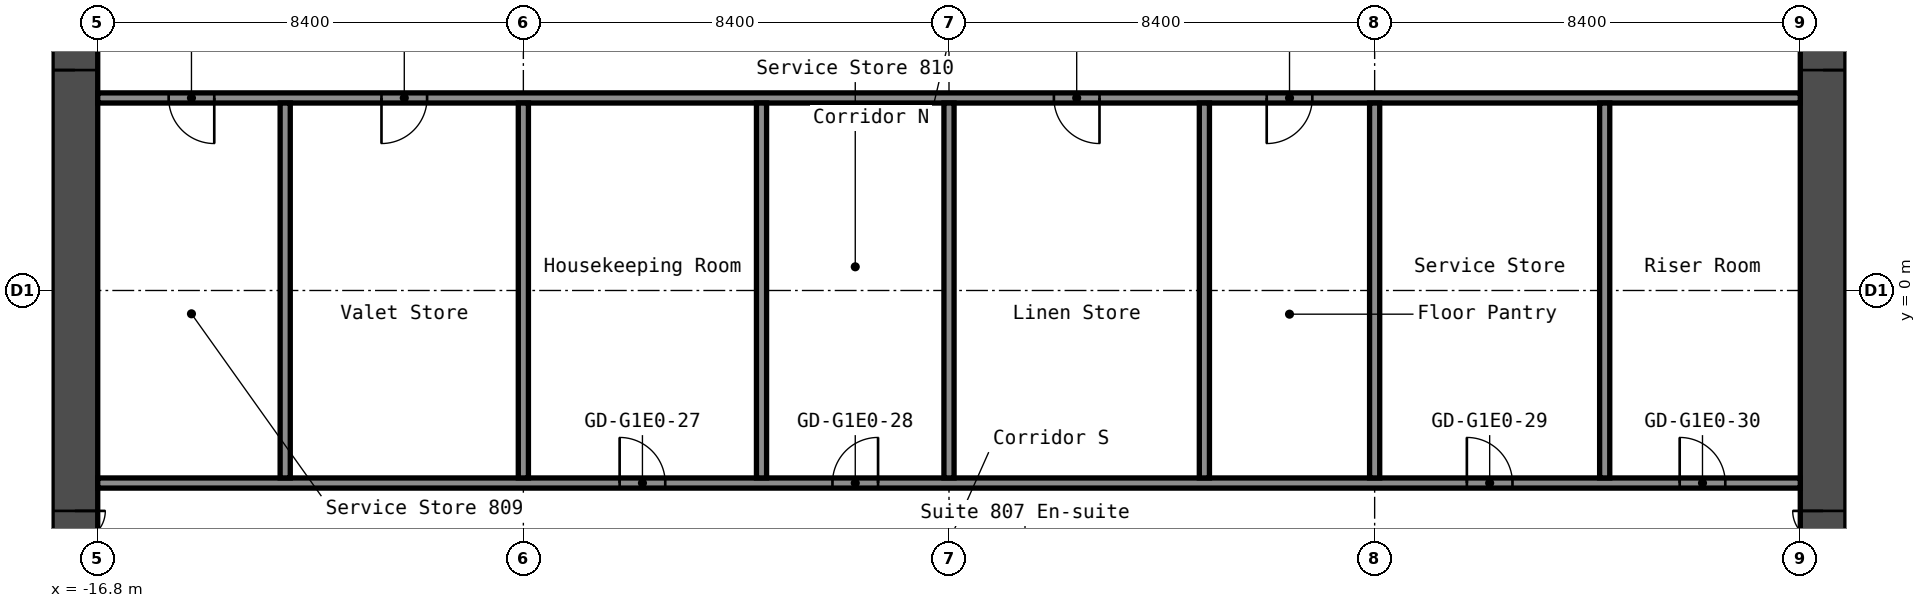
"""IFC4 building model, lengths in metres.
Left out: names, types, materials, properties, quantities, classifications, styles, units other than length and angle.
Written with IfcOpenShell. Run it as: python <this file> out.ifc"""

import sys

from ifc_helpers import new_model, si_unit, direction, frame, frame_2d, origin, place, context, subcontext, project, spatial, rectangle, extrude, element, fill, save


model = new_model("IFC4")
c1 = context("Model", 3, precision=1e-05, world=origin(), true_north=direction((0.0, 1.0)))
c2 = subcontext(c1, "Body", "Model", "MODEL_VIEW")
j1 = project(units=[si_unit("LENGTHUNIT", "METRE"), si_unit("PLANEANGLEUNIT", "RADIAN")], contexts=[c1])
p1 = place(None, origin())
s1 = spatial("IfcSite", under=j1, at=p1, CompositionType="ELEMENT")
p2 = place(p1, origin())
s2 = spatial("IfcBuilding", under=s1, at=p2, CompositionType="ELEMENT")
p3 = place(p2, frame((0.0, 0.0, 32.6)))
s3 = spatial("IfcBuildingStorey", under=s2, at=p3, CompositionType="ELEMENT", Elevation=32.6)
p4 = place(p3, frame((-17.25, -8.4, 0.0), z_axis=(0.0, 0.0, 1.0), x_axis=(0.0, 1.0, 0.0)))
e1 = element("IfcWall", 1, at=p4, inside=s3, PredefinedType="SHEAR", context=c2, shape_type="SweptSolid", body=[
    extrude(rectangle(XDim=16.8, YDim=0.9, at=frame_2d((8.4, 0.0))), origin(), (0.0, 0.0, 1.0), 2.8),
])
p5 = place(p4, frame((12.75, 0.0, 0.0)))
e2 = element("IfcOpeningElement", 2, at=p5, cuts=e1, PredefinedType="OPENING", context=c2, shape_type="SweptSolid", body=[
    extrude(rectangle(XDim=1.2, YDim=2.1, at=frame_2d((0.6, 1.05))), frame((0.0, 0.46, 0.0), z_axis=(0.0, -1.0, 0.0), x_axis=(1.0, 0.0, 0.0)), (0.0, 0.0, 1.0), 0.92),
])
p6 = place(p4, frame((2.85, 0.0, 0.0)))
e3 = element("IfcOpeningElement", 3, at=p6, cuts=e1, PredefinedType="OPENING", context=c2, shape_type="SweptSolid", body=[
    extrude(rectangle(XDim=1.2, YDim=2.1, at=frame_2d((0.6, 1.05))), frame((0.0, 0.46, 0.0), z_axis=(0.0, -1.0, 0.0), x_axis=(1.0, 0.0, 0.0)), (0.0, 0.0, 1.0), 0.92),
])
p7 = place(p3, frame((17.25, -8.4, 0.0), z_axis=(0.0, 0.0, 1.0), x_axis=(0.0, 1.0, 0.0)))
e4 = element("IfcWall", 4, at=p7, inside=s3, PredefinedType="SHEAR", context=c2, shape_type="SweptSolid", body=[
    extrude(rectangle(XDim=16.8, YDim=0.9, at=frame_2d((8.4, 0.0))), origin(), (0.0, 0.0, 1.0), 2.8),
])
p8 = place(p7, frame((12.75, 0.0, 0.0)))
e5 = element("IfcOpeningElement", 5, at=p8, cuts=e4, PredefinedType="OPENING", context=c2, shape_type="SweptSolid", body=[
    extrude(rectangle(XDim=1.2, YDim=2.1, at=frame_2d((0.6, 1.05))), frame((0.0, 0.46, 0.0), z_axis=(0.0, -1.0, 0.0), x_axis=(1.0, 0.0, 0.0)), (0.0, 0.0, 1.0), 0.92),
])
p9 = place(p7, frame((2.85, 0.0, 0.0)))
e6 = element("IfcOpeningElement", 6, at=p9, cuts=e4, PredefinedType="OPENING", context=c2, shape_type="SweptSolid", body=[
    extrude(rectangle(XDim=1.2, YDim=2.1, at=frame_2d((0.6, 1.05))), frame((0.0, 0.46, 0.0), z_axis=(0.0, -1.0, 0.0), x_axis=(1.0, 0.0, 0.0)), (0.0, 0.0, 1.0), 0.92),
])
p10 = place(p3, frame((-16.8, -3.8, 0.0), z_axis=(0.0, 0.0, 1.0), x_axis=(1.0, 0.0, 0.0)))
e7 = element("IfcWall", 7, at=p10, inside=s3, PredefinedType="PARTITIONING", context=c2, shape_type="SweptSolid", body=[
    extrude(rectangle(XDim=33.6, YDim=0.2, at=frame_2d((16.8, 0.0))), origin(), (0.0, 0.0, 1.0), 2.8),
])
p11 = place(p10, frame((10.3, 0.0, 0.0)))
e8 = element("IfcOpeningElement", 8, at=p11, cuts=e7, PredefinedType="OPENING", context=c2, shape_type="SweptSolid", body=[
    extrude(rectangle(XDim=0.9, YDim=2.1, at=frame_2d((0.45, 1.05))), frame((0.0, 0.11, 0.0), z_axis=(0.0, -1.0, 0.0), x_axis=(1.0, 0.0, 0.0)), (0.0, 0.0, 1.0), 0.22),
])
p12 = place(p10, frame((14.5, 0.0, 0.0)))
e9 = element("IfcOpeningElement", 9, at=p12, cuts=e7, PredefinedType="OPENING", context=c2, shape_type="SweptSolid", body=[
    extrude(rectangle(XDim=0.9, YDim=2.1, at=frame_2d((0.45, 1.05))), frame((0.0, 0.11, 0.0), z_axis=(0.0, -1.0, 0.0), x_axis=(1.0, 0.0, 0.0)), (0.0, 0.0, 1.0), 0.22),
])
p13 = place(p10, frame((27.02, 0.0, 0.0)))
e10 = element("IfcOpeningElement", 10, at=p13, cuts=e7, PredefinedType="OPENING", context=c2, shape_type="SweptSolid", body=[
    extrude(rectangle(XDim=0.9, YDim=2.1, at=frame_2d((0.45, 1.05))), frame((0.0, 0.11, 0.0), z_axis=(0.0, -1.0, 0.0), x_axis=(1.0, 0.0, 0.0)), (0.0, 0.0, 1.0), 0.22),
])
p14 = place(p10, frame((31.22, 0.0, 0.0)))
e11 = element("IfcOpeningElement", 11, at=p14, cuts=e7, PredefinedType="OPENING", context=c2, shape_type="SweptSolid", body=[
    extrude(rectangle(XDim=0.9, YDim=2.1, at=frame_2d((0.45, 1.05))), frame((0.0, 0.11, 0.0), z_axis=(0.0, -1.0, 0.0), x_axis=(1.0, 0.0, 0.0)), (0.0, 0.0, 1.0), 0.22),
])
p15 = place(p3, frame((-16.8, 3.8, 0.0), z_axis=(0.0, 0.0, 1.0), x_axis=(1.0, 0.0, 0.0)))
e12 = element("IfcWall", 12, at=p15, inside=s3, PredefinedType="PARTITIONING", context=c2, shape_type="SweptSolid", body=[
    extrude(rectangle(XDim=33.6, YDim=0.2, at=frame_2d((16.8, 0.0))), origin(), (0.0, 0.0, 1.0), 2.8),
])
p16 = place(p15, frame((1.4, 0.0, 0.0)))
e13 = element("IfcOpeningElement", 13, at=p16, cuts=e12, PredefinedType="OPENING", context=c2, shape_type="SweptSolid", body=[
    extrude(rectangle(XDim=0.9, YDim=2.1, at=frame_2d((0.45, 1.05))), frame((0.0, 0.11, 0.0), z_axis=(0.0, -1.0, 0.0), x_axis=(1.0, 0.0, 0.0)), (0.0, 0.0, 1.0), 0.22),
])
p17 = place(p15, frame((5.6, 0.0, 0.0)))
e14 = element("IfcOpeningElement", 14, at=p17, cuts=e12, PredefinedType="OPENING", context=c2, shape_type="SweptSolid", body=[
    extrude(rectangle(XDim=0.9, YDim=2.1, at=frame_2d((0.45, 1.05))), frame((0.0, 0.11, 0.0), z_axis=(0.0, -1.0, 0.0), x_axis=(1.0, 0.0, 0.0)), (0.0, 0.0, 1.0), 0.22),
])
p18 = place(p15, frame((18.87, 0.0, 0.0)))
e15 = element("IfcOpeningElement", 15, at=p18, cuts=e12, PredefinedType="OPENING", context=c2, shape_type="SweptSolid", body=[
    extrude(rectangle(XDim=0.9, YDim=2.1, at=frame_2d((0.45, 1.05))), frame((0.0, 0.11, 0.0), z_axis=(0.0, -1.0, 0.0), x_axis=(1.0, 0.0, 0.0)), (0.0, 0.0, 1.0), 0.22),
])
p19 = place(p15, frame((23.07, 0.0, 0.0)))
e16 = element("IfcOpeningElement", 16, at=p19, cuts=e12, PredefinedType="OPENING", context=c2, shape_type="SweptSolid", body=[
    extrude(rectangle(XDim=0.9, YDim=2.1, at=frame_2d((0.45, 1.05))), frame((0.0, 0.11, 0.0), z_axis=(0.0, -1.0, 0.0), x_axis=(1.0, 0.0, 0.0)), (0.0, 0.0, 1.0), 0.22),
])
for number, where, z_axis, x_axis in (
    (17, (-13.1, -3.7, 0.0), (0.0, 0.0, 1.0), (0.0, 1.0, 0.0)),
    (18, (-8.4, -3.7, 0.0), (0.0, 0.0, 1.0), (0.0, 1.0, 0.0)),
    (19, (-3.7, -3.7, 0.0), (0.0, 0.0, 1.0), (0.0, 1.0, 0.0)),
    (20, (0.0, -3.7, 0.0), (0.0, 0.0, 1.0), (0.0, 1.0, 0.0)),
    (21, (5.04, -3.7, 0.0), (0.0, 0.0, 1.0), (0.0, 1.0, 0.0)),
    (22, (8.4, -3.7, 0.0), (0.0, 0.0, 1.0), (0.0, 1.0, 0.0)),
    (23, (12.94, -3.7, 0.0), (0.0, 0.0, 1.0), (0.0, 1.0, 0.0)),
):
    element("IfcWall", number, at=place(p3, frame(where, z_axis=z_axis, x_axis=x_axis)), inside=s3, PredefinedType="PARTITIONING", context=c2, shape_type="SweptSolid", body=[
        extrude(rectangle(XDim=7.4, YDim=0.2, at=frame_2d((3.7, 0.0))), origin(), (0.0, 0.0, 1.0), 2.8),
    ])
p20 = place(p5, origin())
e24 = element("IfcDoor", 24, at=p20, inside=s3, OperationType="DOUBLE_DOOR_SINGLE_SWING", PredefinedType="DOOR", context=c2, shape_type="SweptSolid", body=[
    extrude(rectangle(XDim=1.2, YDim=2.1, at=frame_2d((0.6, 1.05))), frame((0.0, 0.025, 0.0), z_axis=(0.0, -1.0, 0.0), x_axis=(1.0, 0.0, 0.0)), (0.0, 0.0, 1.0), 0.05),
])
fill(e2, e24)
p21 = place(p6, origin())
e25 = element("IfcDoor", 25, at=p21, inside=s3, OperationType="DOUBLE_DOOR_SINGLE_SWING", PredefinedType="DOOR", context=c2, shape_type="SweptSolid", body=[
    extrude(rectangle(XDim=1.2, YDim=2.1, at=frame_2d((0.6, 1.05))), frame((0.0, 0.025, 0.0), z_axis=(0.0, -1.0, 0.0), x_axis=(1.0, 0.0, 0.0)), (0.0, 0.0, 1.0), 0.05),
])
fill(e3, e25)
p22 = place(p8, origin())
e26 = element("IfcDoor", 26, at=p22, inside=s3, OperationType="DOUBLE_DOOR_SINGLE_SWING", PredefinedType="DOOR", context=c2, shape_type="SweptSolid", body=[
    extrude(rectangle(XDim=1.2, YDim=2.1, at=frame_2d((0.6, 1.05))), frame((0.0, 0.025, 0.0), z_axis=(0.0, -1.0, 0.0), x_axis=(1.0, 0.0, 0.0)), (0.0, 0.0, 1.0), 0.05),
])
fill(e5, e26)
p23 = place(p9, origin())
e27 = element("IfcDoor", 27, at=p23, inside=s3, OperationType="DOUBLE_DOOR_SINGLE_SWING", PredefinedType="DOOR", context=c2, shape_type="SweptSolid", body=[
    extrude(rectangle(XDim=1.2, YDim=2.1, at=frame_2d((0.6, 1.05))), frame((0.0, 0.025, 0.0), z_axis=(0.0, -1.0, 0.0), x_axis=(1.0, 0.0, 0.0)), (0.0, 0.0, 1.0), 0.05),
])
fill(e6, e27)
p24 = place(p11, origin())
e28 = element("IfcDoor", 28, at=p24, inside=s3, OperationType="SINGLE_SWING_RIGHT", PredefinedType="DOOR", context=c2, shape_type="SweptSolid", body=[
    extrude(rectangle(XDim=0.9, YDim=2.1, at=frame_2d((0.45, 1.05))), frame((0.0, 0.025, 0.0), z_axis=(0.0, -1.0, 0.0), x_axis=(1.0, 0.0, 0.0)), (0.0, 0.0, 1.0), 0.05),
])
fill(e8, e28)
p25 = place(p12, origin())
e29 = element("IfcDoor", 29, at=p25, inside=s3, OperationType="SINGLE_SWING_LEFT", PredefinedType="DOOR", context=c2, shape_type="SweptSolid", body=[
    extrude(rectangle(XDim=0.9, YDim=2.1, at=frame_2d((0.45, 1.05))), frame((0.0, 0.025, 0.0), z_axis=(0.0, -1.0, 0.0), x_axis=(1.0, 0.0, 0.0)), (0.0, 0.0, 1.0), 0.05),
])
fill(e9, e29)
p26 = place(p13, origin())
e30 = element("IfcDoor", 30, at=p26, inside=s3, OperationType="SINGLE_SWING_RIGHT", PredefinedType="DOOR", context=c2, shape_type="SweptSolid", body=[
    extrude(rectangle(XDim=0.9, YDim=2.1, at=frame_2d((0.45, 1.05))), frame((0.0, 0.025, 0.0), z_axis=(0.0, -1.0, 0.0), x_axis=(1.0, 0.0, 0.0)), (0.0, 0.0, 1.0), 0.05),
])
fill(e10, e30)
p27 = place(p14, origin())
e31 = element("IfcDoor", 31, at=p27, inside=s3, OperationType="SINGLE_SWING_RIGHT", PredefinedType="DOOR", context=c2, shape_type="SweptSolid", body=[
    extrude(rectangle(XDim=0.9, YDim=2.1, at=frame_2d((0.45, 1.05))), frame((0.0, 0.025, 0.0), z_axis=(0.0, -1.0, 0.0), x_axis=(1.0, 0.0, 0.0)), (0.0, 0.0, 1.0), 0.05),
])
fill(e11, e31)
p28 = place(p16, origin())
e32 = element("IfcDoor", 32, at=p28, inside=s3, OperationType="SINGLE_SWING_RIGHT", PredefinedType="DOOR", context=c2, shape_type="SweptSolid", body=[
    extrude(rectangle(XDim=0.9, YDim=2.1, at=frame_2d((0.45, 1.05))), frame((0.0, 0.025, 0.0), z_axis=(0.0, -1.0, 0.0), x_axis=(1.0, 0.0, 0.0)), (0.0, 0.0, 1.0), 0.05),
])
fill(e13, e32)
p29 = place(p17, origin())
e33 = element("IfcDoor", 33, at=p29, inside=s3, OperationType="SINGLE_SWING_LEFT", PredefinedType="DOOR", context=c2, shape_type="SweptSolid", body=[
    extrude(rectangle(XDim=0.9, YDim=2.1, at=frame_2d((0.45, 1.05))), frame((0.0, 0.025, 0.0), z_axis=(0.0, -1.0, 0.0), x_axis=(1.0, 0.0, 0.0)), (0.0, 0.0, 1.0), 0.05),
])
fill(e14, e33)
p30 = place(p18, origin())
e34 = element("IfcDoor", 34, at=p30, inside=s3, OperationType="SINGLE_SWING_RIGHT", PredefinedType="DOOR", context=c2, shape_type="SweptSolid", body=[
    extrude(rectangle(XDim=0.9, YDim=2.1, at=frame_2d((0.45, 1.05))), frame((0.0, 0.025, 0.0), z_axis=(0.0, -1.0, 0.0), x_axis=(1.0, 0.0, 0.0)), (0.0, 0.0, 1.0), 0.05),
])
fill(e15, e34)
p31 = place(p19, origin())
e35 = element("IfcDoor", 35, at=p31, inside=s3, OperationType="SINGLE_SWING_LEFT", PredefinedType="DOOR", context=c2, shape_type="SweptSolid", body=[
    extrude(rectangle(XDim=0.9, YDim=2.1, at=frame_2d((0.45, 1.05))), frame((0.0, 0.025, 0.0), z_axis=(0.0, -1.0, 0.0), x_axis=(1.0, 0.0, 0.0)), (0.0, 0.0, 1.0), 0.05),
])
fill(e16, e35)
save(model, sys.argv[1])
